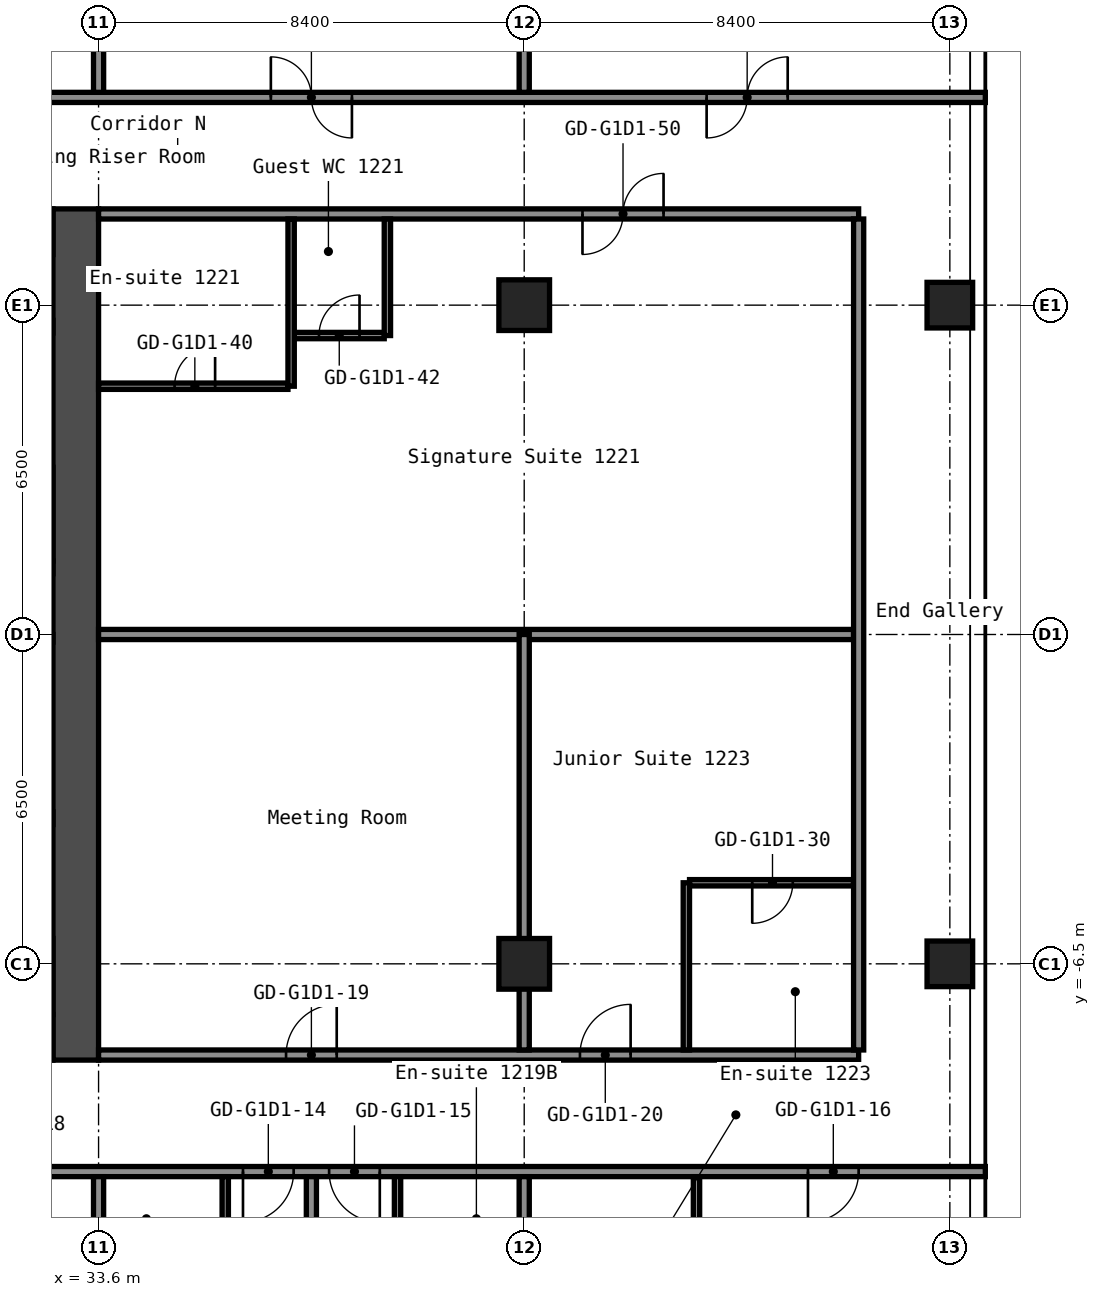
"""IFC4 building model, lengths in metres.
Left out: names, types, materials, properties, quantities, classifications, styles, units other than length and angle.
Written with IfcOpenShell. Run it as: python <this file> out.ifc"""

import sys

from ifc_helpers import new_model, si_unit, direction, frame, frame_2d, origin, origin_2d, place, context, subcontext, project, spatial, rectangle, hollow_rectangle, extrude, element, fill, save


model = new_model("IFC4")
c1 = context("Model", 3, precision=1e-05, world=origin(), true_north=direction((0.0, 1.0)))
c2 = subcontext(c1, "Body", "Model", "MODEL_VIEW")
j1 = project(units=[si_unit("LENGTHUNIT", "METRE"), si_unit("PLANEANGLEUNIT", "RADIAN")], contexts=[c1])
p1 = place(None, origin())
s1 = spatial("IfcSite", under=j1, at=p1, CompositionType="ELEMENT")
p2 = place(p1, origin())
s2 = spatial("IfcBuilding", under=s1, at=p2, CompositionType="ELEMENT")
p3 = place(p2, frame((0.0, 0.0, 45.4)))
s3 = spatial("IfcBuildingStorey", under=s2, at=p3, CompositionType="ELEMENT", Elevation=45.4)
for number, where, z_axis, x_axis in (
    (1, (42.0, -6.5, 0.0), (0.0, 0.0, 1.0), (1.0, 0.0, 0.0)),
    (2, (42.0, 6.5, 0.0), (0.0, 0.0, 1.0), (1.0, 0.0, 0.0)),
):
    element("IfcColumn", number, at=place(p3, frame(where, z_axis=z_axis, x_axis=x_axis)), inside=s3, PredefinedType="COLUMN", context=c2, shape_type="SweptSolid", body=[
        extrude(hollow_rectangle(XDim=1.0, YDim=1.0, WallThickness=0.04, at=origin_2d()), origin(), (0.0, 0.0, 1.0), 2.8),
    ])
for number, where, z_axis, x_axis in (
    (3, (50.4, -6.5, 0.0), (0.0, 0.0, 1.0), (1.0, 0.0, 0.0)),
    (4, (50.4, 6.5, 0.0), (0.0, 0.0, 1.0), (1.0, 0.0, 0.0)),
):
    element("IfcColumn", number, at=place(p3, frame(where, z_axis=z_axis, x_axis=x_axis)), inside=s3, PredefinedType="COLUMN", context=c2, shape_type="SweptSolid", body=[
        extrude(hollow_rectangle(XDim=0.9, YDim=0.9, WallThickness=0.036, at=origin_2d()), origin(), (0.0, 0.0, 1.0), 2.8),
    ])
p4 = place(p3, frame((33.15, -8.4, 0.0), z_axis=(0.0, 0.0, 1.0), x_axis=(0.0, 1.0, 0.0)))
e5 = element("IfcWall", 5, at=p4, inside=s3, PredefinedType="SHEAR", context=c2, shape_type="SweptSolid", body=[
    extrude(rectangle(XDim=16.8, YDim=0.9, at=frame_2d((8.4, 0.0))), origin(), (0.0, 0.0, 1.0), 2.8),
])
p5 = place(p3, frame((16.8, -10.6, 0.0), z_axis=(0.0, 0.0, 1.0), x_axis=(1.0, 0.0, 0.0)))
e6 = element("IfcWall", 6, at=p5, inside=s3, PredefinedType="PARTITIONING", context=c2, shape_type="SweptSolid", body=[
    extrude(rectangle(XDim=34.3, YDim=0.2, at=frame_2d((17.15, 0.0))), origin(), (0.0, 0.0, 1.0), 2.8),
])
p6 = place(p5, frame((2.85, 0.0, 0.0)))
e7 = element("IfcOpeningElement", 7, at=p6, cuts=e6, PredefinedType="OPENING", context=c2, shape_type="SweptSolid", body=[
    extrude(rectangle(XDim=1.0, YDim=2.1, at=frame_2d((0.5, 1.05))), frame((0.0, 0.11, 0.0), z_axis=(0.0, -1.0, 0.0), x_axis=(1.0, 0.0, 0.0)), (0.0, 0.0, 1.0), 0.22),
])
p7 = place(p5, frame((4.55, 0.0, 0.0)))
e8 = element("IfcOpeningElement", 8, at=p7, cuts=e6, PredefinedType="OPENING", context=c2, shape_type="SweptSolid", body=[
    extrude(rectangle(XDim=1.0, YDim=2.1, at=frame_2d((0.5, 1.05))), frame((0.0, 0.11, 0.0), z_axis=(0.0, -1.0, 0.0), x_axis=(1.0, 0.0, 0.0)), (0.0, 0.0, 1.0), 0.22),
])
p8 = place(p5, frame((10.4, 0.0, 0.0)))
e9 = element("IfcOpeningElement", 9, at=p8, cuts=e6, PredefinedType="OPENING", context=c2, shape_type="SweptSolid", body=[
    extrude(rectangle(XDim=1.0, YDim=2.1, at=frame_2d((0.5, 1.05))), frame((0.0, 0.11, 0.0), z_axis=(0.0, -1.0, 0.0), x_axis=(1.0, 0.0, 0.0)), (0.0, 0.0, 1.0), 0.22),
])
p9 = place(p5, frame((19.65, 0.0, 0.0)))
e10 = element("IfcOpeningElement", 10, at=p9, cuts=e6, PredefinedType="OPENING", context=c2, shape_type="SweptSolid", body=[
    extrude(rectangle(XDim=1.0, YDim=2.1, at=frame_2d((0.5, 1.05))), frame((0.0, 0.11, 0.0), z_axis=(0.0, -1.0, 0.0), x_axis=(1.0, 0.0, 0.0)), (0.0, 0.0, 1.0), 0.22),
])
p10 = place(p5, frame((21.35, 0.0, 0.0)))
e11 = element("IfcOpeningElement", 11, at=p10, cuts=e6, PredefinedType="OPENING", context=c2, shape_type="SweptSolid", body=[
    extrude(rectangle(XDim=1.0, YDim=2.1, at=frame_2d((0.5, 1.05))), frame((0.0, 0.11, 0.0), z_axis=(0.0, -1.0, 0.0), x_axis=(1.0, 0.0, 0.0)), (0.0, 0.0, 1.0), 0.22),
])
p11 = place(p5, frame((30.8, 0.0, 0.0)))
e12 = element("IfcOpeningElement", 12, at=p11, cuts=e6, PredefinedType="OPENING", context=c2, shape_type="SweptSolid", body=[
    extrude(rectangle(XDim=1.0, YDim=2.1, at=frame_2d((0.5, 1.05))), frame((0.0, 0.11, 0.0), z_axis=(0.0, -1.0, 0.0), x_axis=(1.0, 0.0, 0.0)), (0.0, 0.0, 1.0), 0.22),
])
p12 = place(p3, frame((33.6, -8.3, 0.0), z_axis=(0.0, 0.0, 1.0), x_axis=(1.0, 0.0, 0.0)))
e13 = element("IfcWall", 13, at=p12, inside=s3, PredefinedType="PARTITIONING", context=c2, shape_type="SweptSolid", body=[
    extrude(rectangle(XDim=15.0, YDim=0.2, at=frame_2d((7.5, 0.0))), origin(), (0.0, 0.0, 1.0), 2.8),
])
p13 = place(p12, frame((3.7, 0.0, 0.0)))
e14 = element("IfcOpeningElement", 14, at=p13, cuts=e13, PredefinedType="OPENING", context=c2, shape_type="SweptSolid", body=[
    extrude(rectangle(XDim=1.0, YDim=2.1, at=frame_2d((0.5, 1.05))), frame((0.0, 0.11, 0.0), z_axis=(0.0, -1.0, 0.0), x_axis=(1.0, 0.0, 0.0)), (0.0, 0.0, 1.0), 0.22),
])
p14 = place(p12, frame((9.5, 0.0, 0.0)))
e15 = element("IfcOpeningElement", 15, at=p14, cuts=e13, PredefinedType="OPENING", context=c2, shape_type="SweptSolid", body=[
    extrude(rectangle(XDim=1.0, YDim=2.1, at=frame_2d((0.5, 1.05))), frame((0.0, 0.11, 0.0), z_axis=(0.0, -1.0, 0.0), x_axis=(1.0, 0.0, 0.0)), (0.0, 0.0, 1.0), 0.22),
])
p15 = place(p3, frame((45.262, -4.9, 0.0), z_axis=(0.0, 0.0, 1.0), x_axis=(1.0, 0.0, 0.0)))
e16 = element("IfcWall", 16, at=p15, inside=s3, PredefinedType="PARTITIONING", context=c2, shape_type="SweptSolid", body=[
    extrude(rectangle(XDim=3.238, YDim=0.125, at=frame_2d((1.619, 0.0))), origin(), (0.0, 0.0, 1.0), 2.8),
])
p16 = place(p15, frame((1.238, 0.0, 0.0)))
e17 = element("IfcOpeningElement", 17, at=p16, cuts=e16, PredefinedType="OPENING", context=c2, shape_type="SweptSolid", body=[
    extrude(rectangle(XDim=0.8, YDim=2.1, at=frame_2d((0.4, 1.05))), frame((0.0, 0.073, 0.0), z_axis=(0.0, -1.0, 0.0), x_axis=(1.0, 0.0, 0.0)), (0.0, 0.0, 1.0), 0.145),
])
p17 = place(p3, frame((33.6, 0.0, 0.0), z_axis=(0.0, 0.0, 1.0), x_axis=(1.0, 0.0, 0.0)))
e18 = element("IfcWall", 18, at=p17, inside=s3, PredefinedType="PARTITIONING", context=c2, shape_type="SweptSolid", body=[
    extrude(rectangle(XDim=14.9, YDim=0.2, at=frame_2d((7.45, 0.0))), origin(), (0.0, 0.0, 1.0), 2.8),
])
p18 = place(p3, frame((33.6, 4.9, 0.0), z_axis=(0.0, 0.0, 1.0), x_axis=(1.0, 0.0, 0.0)))
e19 = element("IfcWall", 19, at=p18, inside=s3, PredefinedType="PARTITIONING", context=c2, shape_type="SweptSolid", body=[
    extrude(rectangle(XDim=3.737, YDim=0.125, at=frame_2d((1.869, 0.0))), origin(), (0.0, 0.0, 1.0), 2.8),
])
p19 = place(p18, frame((1.5, 0.0, 0.0)))
e20 = element("IfcOpeningElement", 20, at=p19, cuts=e19, PredefinedType="OPENING", context=c2, shape_type="SweptSolid", body=[
    extrude(rectangle(XDim=0.8, YDim=2.1, at=frame_2d((0.4, 1.05))), frame((0.0, 0.073, 0.0), z_axis=(0.0, -1.0, 0.0), x_axis=(1.0, 0.0, 0.0)), (0.0, 0.0, 1.0), 0.145),
])
p20 = place(p3, frame((37.462, 5.9, 0.0), z_axis=(0.0, 0.0, 1.0), x_axis=(1.0, 0.0, 0.0)))
e21 = element("IfcWall", 21, at=p20, inside=s3, PredefinedType="PARTITIONING", context=c2, shape_type="SweptSolid", body=[
    extrude(rectangle(XDim=1.775, YDim=0.125, at=frame_2d((0.888, 0.0))), origin(), (0.0, 0.0, 1.0), 2.8),
])
p21 = place(p20, frame((0.488, 0.0, 0.0)))
e22 = element("IfcOpeningElement", 22, at=p21, cuts=e21, PredefinedType="OPENING", context=c2, shape_type="SweptSolid", body=[
    extrude(rectangle(XDim=0.8, YDim=2.1, at=frame_2d((0.4, 1.05))), frame((0.0, 0.073, 0.0), z_axis=(0.0, -1.0, 0.0), x_axis=(1.0, 0.0, 0.0)), (0.0, 0.0, 1.0), 0.145),
])
p22 = place(p3, frame((33.6, 8.3, 0.0), z_axis=(0.0, 0.0, 1.0), x_axis=(1.0, 0.0, 0.0)))
e23 = element("IfcWall", 23, at=p22, inside=s3, PredefinedType="PARTITIONING", context=c2, shape_type="SweptSolid", body=[
    extrude(rectangle(XDim=15.0, YDim=0.2, at=frame_2d((7.5, 0.0))), origin(), (0.0, 0.0, 1.0), 2.8),
])
p23 = place(p22, frame((9.55, 0.0, 0.0)))
e24 = element("IfcOpeningElement", 24, at=p23, cuts=e23, PredefinedType="OPENING", context=c2, shape_type="SweptSolid", body=[
    extrude(rectangle(XDim=1.6, YDim=2.1, at=frame_2d((0.8, 1.05))), frame((0.0, 0.11, 0.0), z_axis=(0.0, -1.0, 0.0), x_axis=(1.0, 0.0, 0.0)), (0.0, 0.0, 1.0), 0.22),
])
p24 = place(p3, frame((16.8, 10.6, 0.0), z_axis=(0.0, 0.0, 1.0), x_axis=(1.0, 0.0, 0.0)))
e25 = element("IfcWall", 25, at=p24, inside=s3, PredefinedType="PARTITIONING", context=c2, shape_type="SweptSolid", body=[
    extrude(rectangle(XDim=34.3, YDim=0.2, at=frame_2d((17.15, 0.0))), origin(), (0.0, 0.0, 1.0), 2.8),
])
p25 = place(p24, frame((3.4, 0.0, 0.0)))
e26 = element("IfcOpeningElement", 26, at=p25, cuts=e25, PredefinedType="OPENING", context=c2, shape_type="SweptSolid", body=[
    extrude(rectangle(XDim=1.6, YDim=2.1, at=frame_2d((0.8, 1.05))), frame((0.0, 0.11, 0.0), z_axis=(0.0, -1.0, 0.0), x_axis=(1.0, 0.0, 0.0)), (0.0, 0.0, 1.0), 0.22),
])
p26 = place(p24, frame((11.8, 0.0, 0.0)))
e27 = element("IfcOpeningElement", 27, at=p26, cuts=e25, PredefinedType="OPENING", context=c2, shape_type="SweptSolid", body=[
    extrude(rectangle(XDim=1.6, YDim=2.1, at=frame_2d((0.8, 1.05))), frame((0.0, 0.11, 0.0), z_axis=(0.0, -1.0, 0.0), x_axis=(1.0, 0.0, 0.0)), (0.0, 0.0, 1.0), 0.22),
])
p27 = place(p24, frame((20.2, 0.0, 0.0)))
e28 = element("IfcOpeningElement", 28, at=p27, cuts=e25, PredefinedType="OPENING", context=c2, shape_type="SweptSolid", body=[
    extrude(rectangle(XDim=1.6, YDim=2.1, at=frame_2d((0.8, 1.05))), frame((0.0, 0.11, 0.0), z_axis=(0.0, -1.0, 0.0), x_axis=(1.0, 0.0, 0.0)), (0.0, 0.0, 1.0), 0.22),
])
p28 = place(p24, frame((28.8, 0.0, 0.0)))
e29 = element("IfcOpeningElement", 29, at=p28, cuts=e25, PredefinedType="OPENING", context=c2, shape_type="SweptSolid", body=[
    extrude(rectangle(XDim=1.6, YDim=2.1, at=frame_2d((0.8, 1.05))), frame((0.0, 0.11, 0.0), z_axis=(0.0, -1.0, 0.0), x_axis=(1.0, 0.0, 0.0)), (0.0, 0.0, 1.0), 0.22),
])
for number, where, z_axis, x_axis in (
    (30, (33.6, -20.3, 0.0), (0.0, 0.0, 1.0), (0.0, 1.0, 0.0)),
    (31, (33.6, 10.7, 0.0), (0.0, 0.0, 1.0), (0.0, 1.0, 0.0)),
):
    element("IfcWall", number, at=place(p3, frame(where, z_axis=z_axis, x_axis=x_axis)), inside=s3, PredefinedType="PARTITIONING", context=c2, shape_type="SweptSolid", body=[
        extrude(rectangle(XDim=9.6, YDim=0.2, at=frame_2d((4.8, 0.0))), origin(), (0.0, 0.0, 1.0), 2.8),
    ])
p29 = place(p3, frame((36.1, -13.6, 0.0), z_axis=(0.0, 0.0, 1.0), x_axis=(0.0, 1.0, 0.0)))
e32 = element("IfcWall", 32, at=p29, inside=s3, PredefinedType="PARTITIONING", context=c2, shape_type="SweptSolid", body=[
    extrude(rectangle(XDim=2.9, YDim=0.125, at=frame_2d((1.45, 0.0))), origin(), (0.0, 0.0, 1.0), 2.8),
])
p30 = place(p29, frame((0.6, 0.0, 0.0)))
e33 = element("IfcOpeningElement", 33, at=p30, cuts=e32, PredefinedType="OPENING", context=c2, shape_type="SweptSolid", body=[
    extrude(rectangle(XDim=0.8, YDim=2.1, at=frame_2d((0.4, 1.05))), frame((0.0, 0.073, 0.0), z_axis=(0.0, -1.0, 0.0), x_axis=(1.0, 0.0, 0.0)), (0.0, 0.0, 1.0), 0.145),
])
p31 = place(p3, frame((37.4, 4.9, 0.0), z_axis=(0.0, 0.0, 1.0), x_axis=(0.0, 1.0, 0.0)))
e34 = element("IfcWall", 34, at=p31, inside=s3, PredefinedType="PARTITIONING", context=c2, shape_type="SweptSolid", body=[
    extrude(rectangle(XDim=3.3, YDim=0.125, at=frame_2d((1.65, 0.0))), origin(), (0.0, 0.0, 1.0), 2.8),
])
p32 = place(p3, frame((37.8, -20.3, 0.0), z_axis=(0.0, 0.0, 1.0), x_axis=(0.0, 1.0, 0.0)))
e35 = element("IfcWall", 35, at=p32, inside=s3, PredefinedType="PARTITIONING", context=c2, shape_type="SweptSolid", body=[
    extrude(rectangle(XDim=9.6, YDim=0.2, at=frame_2d((4.8, 0.0))), origin(), (0.0, 0.0, 1.0), 2.8),
])
p33 = place(p3, frame((39.3, 5.9, 0.0), z_axis=(0.0, 0.0, 1.0), x_axis=(0.0, 1.0, 0.0)))
e36 = element("IfcWall", 36, at=p33, inside=s3, PredefinedType="PARTITIONING", context=c2, shape_type="SweptSolid", body=[
    extrude(rectangle(XDim=2.3, YDim=0.125, at=frame_2d((1.15, 0.0))), origin(), (0.0, 0.0, 1.0), 2.8),
])
p34 = place(p3, frame((39.5, -13.6, 0.0), z_axis=(0.0, 0.0, 1.0), x_axis=(0.0, 1.0, 0.0)))
e37 = element("IfcWall", 37, at=p34, inside=s3, PredefinedType="PARTITIONING", context=c2, shape_type="SweptSolid", body=[
    extrude(rectangle(XDim=2.9, YDim=0.125, at=frame_2d((1.45, 0.0))), origin(), (0.0, 0.0, 1.0), 2.8),
])
p35 = place(p34, frame((0.6, 0.0, 0.0)))
e38 = element("IfcOpeningElement", 38, at=p35, cuts=e37, PredefinedType="OPENING", context=c2, shape_type="SweptSolid", body=[
    extrude(rectangle(XDim=0.8, YDim=2.1, at=frame_2d((0.4, 1.05))), frame((0.0, 0.073, 0.0), z_axis=(0.0, -1.0, 0.0), x_axis=(1.0, 0.0, 0.0)), (0.0, 0.0, 1.0), 0.145),
])
p36 = place(p3, frame((42.0, -20.3, 0.0), z_axis=(0.0, 0.0, 1.0), x_axis=(0.0, 1.0, 0.0)))
e39 = element("IfcWall", 39, at=p36, inside=s3, PredefinedType="PARTITIONING", context=c2, shape_type="SweptSolid", body=[
    extrude(rectangle(XDim=9.6, YDim=0.2, at=frame_2d((4.8, 0.0))), origin(), (0.0, 0.0, 1.0), 2.8),
])
p37 = place(p3, frame((42.0, -8.2, 0.0), z_axis=(0.0, 0.0, 1.0), x_axis=(0.0, 1.0, 0.0)))
e40 = element("IfcWall", 40, at=p37, inside=s3, PredefinedType="PARTITIONING", context=c2, shape_type="SweptSolid", body=[
    extrude(rectangle(XDim=8.2, YDim=0.2, at=frame_2d((4.1, 0.0))), origin(), (0.0, 0.0, 1.0), 2.8),
])
p38 = place(p3, frame((42.0, 10.7, 0.0), z_axis=(0.0, 0.0, 1.0), x_axis=(0.0, 1.0, 0.0)))
e41 = element("IfcWall", 41, at=p38, inside=s3, PredefinedType="PARTITIONING", context=c2, shape_type="SweptSolid", body=[
    extrude(rectangle(XDim=9.6, YDim=0.2, at=frame_2d((4.8, 0.0))), origin(), (0.0, 0.0, 1.0), 2.8),
])
for number, where, z_axis, x_axis in (
    (42, (45.2, -8.2, 0.0), (0.0, 0.0, 1.0), (0.0, 1.0, 0.0)),
    (43, (45.4, -14.0, 0.0), (0.0, 0.0, 1.0), (0.0, 1.0, 0.0)),
):
    element("IfcWall", number, at=place(p3, frame(where, z_axis=z_axis, x_axis=x_axis)), inside=s3, PredefinedType="PARTITIONING", context=c2, shape_type="SweptSolid", body=[
        extrude(rectangle(XDim=3.3, YDim=0.125, at=frame_2d((1.65, 0.0))), origin(), (0.0, 0.0, 1.0), 2.8),
    ])
p39 = place(p3, frame((48.6, -8.2, 0.0), z_axis=(0.0, 0.0, 1.0), x_axis=(0.0, 1.0, 0.0)))
e44 = element("IfcWall", 44, at=p39, inside=s3, PredefinedType="PARTITIONING", context=c2, shape_type="SweptSolid", body=[
    extrude(rectangle(XDim=16.4, YDim=0.2, at=frame_2d((8.2, 0.0))), origin(), (0.0, 0.0, 1.0), 2.8),
])
p40 = place(p9, origin())
e45 = element("IfcDoor", 45, at=p40, inside=s3, OperationType="SINGLE_SWING_LEFT", PredefinedType="DOOR", context=c2, shape_type="SweptSolid", body=[
    extrude(rectangle(XDim=1.0, YDim=2.1, at=frame_2d((0.5, 1.05))), frame((0.0, 0.025, 0.0), z_axis=(0.0, -1.0, 0.0), x_axis=(1.0, 0.0, 0.0)), (0.0, 0.0, 1.0), 0.05),
])
fill(e10, e45)
p41 = place(p10, origin())
e46 = element("IfcDoor", 46, at=p41, inside=s3, OperationType="SINGLE_SWING_RIGHT", PredefinedType="DOOR", context=c2, shape_type="SweptSolid", body=[
    extrude(rectangle(XDim=1.0, YDim=2.1, at=frame_2d((0.5, 1.05))), frame((0.0, 0.025, 0.0), z_axis=(0.0, -1.0, 0.0), x_axis=(1.0, 0.0, 0.0)), (0.0, 0.0, 1.0), 0.05),
])
fill(e11, e46)
p42 = place(p11, origin())
e47 = element("IfcDoor", 47, at=p42, inside=s3, OperationType="SINGLE_SWING_LEFT", PredefinedType="DOOR", context=c2, shape_type="SweptSolid", body=[
    extrude(rectangle(XDim=1.0, YDim=2.1, at=frame_2d((0.5, 1.05))), frame((0.0, 0.025, 0.0), z_axis=(0.0, -1.0, 0.0), x_axis=(1.0, 0.0, 0.0)), (0.0, 0.0, 1.0), 0.05),
])
fill(e12, e47)
p43 = place(p13, origin())
e48 = element("IfcDoor", 48, at=p43, inside=s3, OperationType="SINGLE_SWING_LEFT", PredefinedType="DOOR", context=c2, shape_type="SweptSolid", body=[
    extrude(rectangle(XDim=1.0, YDim=2.1, at=frame_2d((0.5, 1.05))), frame((0.0, 0.025, 0.0), z_axis=(0.0, -1.0, 0.0), x_axis=(1.0, 0.0, 0.0)), (0.0, 0.0, 1.0), 0.05),
])
fill(e14, e48)
p44 = place(p14, origin())
e49 = element("IfcDoor", 49, at=p44, inside=s3, OperationType="SINGLE_SWING_LEFT", PredefinedType="DOOR", context=c2, shape_type="SweptSolid", body=[
    extrude(rectangle(XDim=1.0, YDim=2.1, at=frame_2d((0.5, 1.05))), frame((0.0, 0.025, 0.0), z_axis=(0.0, -1.0, 0.0), x_axis=(1.0, 0.0, 0.0)), (0.0, 0.0, 1.0), 0.05),
])
fill(e15, e49)
p45 = place(p16, origin())
e50 = element("IfcDoor", 50, at=p45, inside=s3, OperationType="SINGLE_SWING_LEFT", PredefinedType="DOOR", context=c2, shape_type="SweptSolid", body=[
    extrude(rectangle(XDim=0.8, YDim=2.1, at=frame_2d((0.4, 1.05))), frame((0.0, 0.025, 0.0), z_axis=(0.0, -1.0, 0.0), x_axis=(1.0, 0.0, 0.0)), (0.0, 0.0, 1.0), 0.05),
])
fill(e17, e50)
p46 = place(p19, origin())
e51 = element("IfcDoor", 51, at=p46, inside=s3, OperationType="SINGLE_SWING_LEFT", PredefinedType="DOOR", context=c2, shape_type="SweptSolid", body=[
    extrude(rectangle(XDim=0.8, YDim=2.1, at=frame_2d((0.4, 1.05))), frame((0.0, 0.025, 0.0), z_axis=(0.0, -1.0, 0.0), x_axis=(1.0, 0.0, 0.0)), (0.0, 0.0, 1.0), 0.05),
])
fill(e20, e51)
p47 = place(p21, origin())
e52 = element("IfcDoor", 52, at=p47, inside=s3, OperationType="SINGLE_SWING_LEFT", PredefinedType="DOOR", context=c2, shape_type="SweptSolid", body=[
    extrude(rectangle(XDim=0.8, YDim=2.1, at=frame_2d((0.4, 1.05))), frame((0.0, 0.025, 0.0), z_axis=(0.0, -1.0, 0.0), x_axis=(1.0, 0.0, 0.0)), (0.0, 0.0, 1.0), 0.05),
])
fill(e22, e52)
p48 = place(p23, origin())
e53 = element("IfcDoor", 53, at=p48, inside=s3, OperationType="DOUBLE_DOOR_SINGLE_SWING", PredefinedType="DOOR", context=c2, shape_type="SweptSolid", body=[
    extrude(rectangle(XDim=1.6, YDim=2.1, at=frame_2d((0.8, 1.05))), frame((0.0, 0.025, 0.0), z_axis=(0.0, -1.0, 0.0), x_axis=(1.0, 0.0, 0.0)), (0.0, 0.0, 1.0), 0.05),
])
fill(e24, e53)
p49 = place(p27, origin())
e54 = element("IfcDoor", 54, at=p49, inside=s3, OperationType="DOUBLE_DOOR_SINGLE_SWING", PredefinedType="DOOR", context=c2, shape_type="SweptSolid", body=[
    extrude(rectangle(XDim=1.6, YDim=2.1, at=frame_2d((0.8, 1.05))), frame((0.0, 0.025, 0.0), z_axis=(0.0, -1.0, 0.0), x_axis=(1.0, 0.0, 0.0)), (0.0, 0.0, 1.0), 0.05),
])
fill(e28, e54)
p50 = place(p28, origin())
e55 = element("IfcDoor", 55, at=p50, inside=s3, OperationType="DOUBLE_DOOR_SINGLE_SWING", PredefinedType="DOOR", context=c2, shape_type="SweptSolid", body=[
    extrude(rectangle(XDim=1.6, YDim=2.1, at=frame_2d((0.8, 1.05))), frame((0.0, 0.025, 0.0), z_axis=(0.0, -1.0, 0.0), x_axis=(1.0, 0.0, 0.0)), (0.0, 0.0, 1.0), 0.05),
])
fill(e29, e55)
save(model, sys.argv[1])
